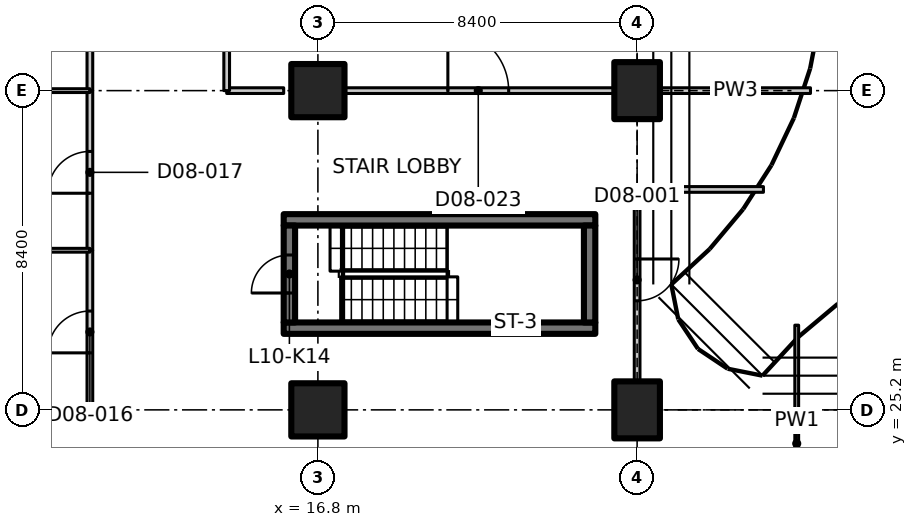
"""IFC4 building model, lengths in metres.
Left out: names, types, materials, properties, quantities, classifications, styles, units other than length and angle.
Written with IfcOpenShell. Run it as: python <this file> out.ifc"""

import sys

from ifc_helpers import new_model, si_unit, direction, frame, frame_2d, origin, origin_2d, place, context, subcontext, project, spatial, polyline, rectangle, outline, extrude, element, fill, save


model = new_model("IFC4")
c1 = context("Model", 3, precision=1e-05, world=origin(), true_north=direction((0.0, 1.0)))
c2 = subcontext(c1, "Body", "Model", "MODEL_VIEW")
j1 = project(units=[si_unit("LENGTHUNIT", "METRE"), si_unit("PLANEANGLEUNIT", "RADIAN")], contexts=[c1])
p1 = place(None, origin())
s1 = spatial("IfcSite", under=j1, at=p1, CompositionType="ELEMENT")
p2 = place(p1, origin())
s2 = spatial("IfcBuilding", under=s1, at=p2, CompositionType="ELEMENT")
p3 = place(p2, frame((0.0, 0.0, 50.9)))
s3 = spatial("IfcBuildingStorey", under=s2, at=p3, CompositionType="ELEMENT", Elevation=50.9)
for number, where, z_axis, x_axis in (
    (1, (16.8, 25.2, 0.0), (0.0, 0.0, 1.0), (1.0, 0.0, 0.0)),
    (2, (16.8, 33.6, 0.0), (0.0, 0.0, 1.0), (1.0, 0.0, 0.0)),
):
    element("IfcColumn", number, at=place(p3, frame(where, z_axis=z_axis, x_axis=x_axis)), inside=s3, PredefinedType="COLUMN", context=c2, shape_type="SweptSolid", body=[
        extrude(rectangle(XDim=1.4, YDim=1.4, at=origin_2d()), origin(), (0.0, 0.0, 1.0), 3.35),
    ])
for number, where, z_axis, x_axis in (
    (3, (25.2, 25.2, 0.0), (0.0, 0.0, 1.0), (1.0, 0.0, 0.0)),
    (4, (25.2, 33.6, 0.0), (0.0, 0.0, 1.0), (1.0, 0.0, 0.0)),
):
    element("IfcColumn", number, at=place(p3, frame(where, z_axis=z_axis, x_axis=x_axis)), inside=s3, PredefinedType="COLUMN", context=c2, shape_type="SweptSolid", body=[
        extrude(rectangle(XDim=1.2, YDim=1.5, at=origin_2d()), origin(), (0.0, 0.0, 1.0), 3.35),
    ])
for number, where, z_axis, x_axis in (
    (5, (15.9, 27.35, 0.0), (0.0, 0.0, 1.0), (1.0, 0.0, 0.0)),
    (6, (15.9, 30.2, 0.0), (0.0, 0.0, 1.0), (1.0, 0.0, 0.0)),
):
    element("IfcWall", number, at=place(p3, frame(where, z_axis=z_axis, x_axis=x_axis)), inside=s3, PredefinedType="SHEAR", context=c2, shape_type="SweptSolid", body=[
        extrude(rectangle(XDim=8.2, YDim=0.3, at=frame_2d((4.1, 0.0))), origin(), (0.0, 0.0, 1.0), 3.35),
    ])
p4 = place(p3, frame((16.05, 27.5, 0.0), z_axis=(0.0, 0.0, 1.0), x_axis=(0.0, 1.0, 0.0)))
e7 = element("IfcWall", 7, at=p4, inside=s3, PredefinedType="SHEAR", context=c2, shape_type="SweptSolid", body=[
    extrude(rectangle(XDim=2.55, YDim=0.3, at=frame_2d((1.275, 0.0))), origin(), (0.0, 0.0, 1.0), 3.35),
])
p5 = place(p4, frame((0.775, 0.0, 0.0)))
e8 = element("IfcOpeningElement", 8, at=p5, cuts=e7, PredefinedType="OPENING", context=c2, shape_type="SweptSolid", body=[
    extrude(rectangle(XDim=1.0, YDim=2.1, at=frame_2d((0.5, 1.05))), frame((0.0, 0.16, 0.0), z_axis=(0.0, -1.0, 0.0), x_axis=(1.0, 0.0, 0.0)), (0.0, 0.0, 1.0), 0.32),
])
p6 = place(p3, frame((23.95, 27.5, 0.0), z_axis=(0.0, 0.0, 1.0), x_axis=(0.0, 1.0, 0.0)))
e9 = element("IfcWall", 9, at=p6, inside=s3, PredefinedType="SHEAR", context=c2, shape_type="SweptSolid", body=[
    extrude(rectangle(XDim=2.55, YDim=0.3, at=frame_2d((1.275, 0.0))), origin(), (0.0, 0.0, 1.0), 3.35),
])
p7 = place(p3, frame((29.4, 27.429, 0.0), z_axis=(0.0, 0.0, 1.0), x_axis=(0.0, -1.0, 0.0)))
e10 = element("IfcWall", 10, at=p7, inside=s3, PredefinedType="PARTITIONING", context=c2, shape_type="SweptSolid", body=[
    extrude(outline(polyline([(0.0, 0.0), (6.229, 0.0), (6.229, 3.33), (2.679, 3.33), (2.677, 2.98), (1.781, 2.98), (1.779, 3.33), (0.154, 3.33), (0.0, 3.33), (0.0, 0.0)])), frame((0.0, 0.05, 0.0), z_axis=(0.0, -1.0, 0.0), x_axis=(1.0, 0.0, 0.0)), (0.0, 0.0, 1.0), 0.1),
])
p8 = place(p3, frame((25.2, 31.0, 0.0), z_axis=(0.0, 0.0, 1.0), x_axis=(0.0, -1.0, 0.0)))
e11 = element("IfcWall", 11, at=p8, inside=s3, PredefinedType="PARTITIONING", context=c2, shape_type="SweptSolid", body=[
    extrude(outline(polyline([(0.0, 0.0), (5.03, 0.0), (5.03, 2.98), (0.0, 2.98), (0.0, 0.0)])), frame((0.0, 0.075, 0.0), z_axis=(0.0, -1.0, 0.0), x_axis=(1.0, 0.0, 0.0)), (0.0, 0.0, 1.0), 0.15),
])
p9 = place(p8, frame((1.83, 0.0, 0.0)))
e12 = element("IfcOpeningElement", 12, at=p9, cuts=e11, PredefinedType="OPENING", context=c2, shape_type="SweptSolid", body=[
    extrude(rectangle(XDim=1.1, YDim=2.1, at=frame_2d((0.55, 1.05))), frame((0.0, 0.085, 0.0), z_axis=(0.0, -1.0, 0.0), x_axis=(1.0, 0.0, 0.0)), (0.0, 0.0, 1.0), 0.17),
])
p10 = place(p3, frame((25.2, 31.0, 0.0), z_axis=(0.0, 0.0, 1.0), x_axis=(1.0, 0.0, 0.0)))
e13 = element("IfcWall", 13, at=p10, inside=s3, PredefinedType="PARTITIONING", context=c2, shape_type="SweptSolid", body=[
    extrude(rectangle(XDim=3.324, YDim=0.15, at=frame_2d((1.662, 0.0))), origin(), (0.0, 0.0, 1.0), 2.98),
])
p11 = place(p3, frame((10.8, 25.2, 0.0), z_axis=(0.0, 0.0, 1.0), x_axis=(0.0, 1.0, 0.0)))
e14 = element("IfcWall", 14, at=p11, inside=s3, PredefinedType="PARTITIONING", context=c2, shape_type="SweptSolid", body=[
    extrude(rectangle(XDim=4.2, YDim=0.15, at=frame_2d((2.1, 0.0))), origin(), (0.0, 0.0, 1.0), 3.33),
])
p12 = place(p11, frame((1.5, 0.0, 0.0)))
e15 = element("IfcOpeningElement", 15, at=p12, cuts=e14, PredefinedType="OPENING", context=c2, shape_type="SweptSolid", body=[
    extrude(rectangle(XDim=1.1, YDim=2.1, at=frame_2d((0.55, 1.05))), frame((0.0, 0.085, 0.0), z_axis=(0.0, -1.0, 0.0), x_axis=(1.0, 0.0, 0.0)), (0.0, 0.0, 1.0), 0.17),
])
p13 = place(p3, frame((10.8, 29.4, 0.0), z_axis=(0.0, 0.0, 1.0), x_axis=(0.0, 1.0, 0.0)))
e16 = element("IfcWall", 16, at=p13, inside=s3, PredefinedType="PARTITIONING", context=c2, shape_type="SweptSolid", body=[
    extrude(rectangle(XDim=4.2, YDim=0.15, at=frame_2d((2.1, 0.0))), origin(), (0.0, 0.0, 1.0), 3.33),
])
p14 = place(p13, frame((1.5, 0.0, 0.0)))
e17 = element("IfcOpeningElement", 17, at=p14, cuts=e16, PredefinedType="OPENING", context=c2, shape_type="SweptSolid", body=[
    extrude(rectangle(XDim=1.1, YDim=2.1, at=frame_2d((0.55, 1.05))), frame((0.0, 0.085, 0.0), z_axis=(0.0, -1.0, 0.0), x_axis=(1.0, 0.0, 0.0)), (0.0, 0.0, 1.0), 0.17),
])
p15 = place(p3, frame((14.4, 33.6, 0.0), z_axis=(0.0, 0.0, 1.0), x_axis=(1.0, 0.0, 0.0)))
e18 = element("IfcWall", 18, at=p15, inside=s3, PredefinedType="PARTITIONING", context=c2, shape_type="SweptSolid", body=[
    extrude(rectangle(XDim=1.5, YDim=0.15, at=frame_2d((0.75, 0.0))), origin(), (0.0, 0.0, 1.0), 3.33),
])
p16 = place(p3, frame((17.52, 33.6, 0.0), z_axis=(0.0, 0.0, 1.0), x_axis=(1.0, 0.0, 0.0)))
e19 = element("IfcWall", 19, at=p16, inside=s3, PredefinedType="PARTITIONING", context=c2, shape_type="SweptSolid", body=[
    extrude(rectangle(XDim=7.06, YDim=0.15, at=frame_2d((3.53, 0.0))), origin(), (0.0, 0.0, 1.0), 3.33),
])
p17 = place(p16, frame((2.7, 0.0, 0.0)))
e20 = element("IfcOpeningElement", 20, at=p17, cuts=e19, PredefinedType="OPENING", context=c2, shape_type="SweptSolid", body=[
    extrude(rectangle(XDim=1.6, YDim=2.1, at=frame_2d((0.8, 1.05))), frame((0.0, 0.085, 0.0), z_axis=(0.0, -1.0, 0.0), x_axis=(1.0, 0.0, 0.0)), (0.0, 0.0, 1.0), 0.17),
])
p18 = place(p3, frame((25.82, 33.6, 0.0), z_axis=(0.0, 0.0, 1.0), x_axis=(1.0, 0.0, 0.0)))
e21 = element("IfcWall", 21, at=p18, inside=s3, PredefinedType="PARTITIONING", context=c2, shape_type="SweptSolid", body=[
    extrude(rectangle(XDim=3.942, YDim=0.15, at=frame_2d((1.971, 0.0))), origin(), (0.0, 0.0, 1.0), 2.98),
])
p19 = place(p3, frame((10.8, 33.6, 0.0), z_axis=(0.0, 0.0, 1.0), x_axis=(0.0, 1.0, 0.0)))
e22 = element("IfcWall", 22, at=p19, inside=s3, PredefinedType="PARTITIONING", context=c2, shape_type="SweptSolid", body=[
    extrude(rectangle(XDim=4.2, YDim=0.15, at=frame_2d((2.1, 0.0))), origin(), (0.0, 0.0, 1.0), 3.33),
])
p20 = place(p19, frame((1.5, 0.0, 0.0)))
e23 = element("IfcOpeningElement", 23, at=p20, cuts=e22, PredefinedType="OPENING", context=c2, shape_type="SweptSolid", body=[
    extrude(rectangle(XDim=1.1, YDim=2.1, at=frame_2d((0.55, 1.05))), frame((0.0, 0.085, 0.0), z_axis=(0.0, -1.0, 0.0), x_axis=(1.0, 0.0, 0.0)), (0.0, 0.0, 1.0), 0.17),
])
p21 = place(p3, frame((14.4, 37.8, 0.0), z_axis=(0.0, 0.0, 1.0), x_axis=(0.0, -1.0, 0.0)))
e24 = element("IfcWall", 24, at=p21, inside=s3, PredefinedType="PARTITIONING", context=c2, shape_type="SweptSolid", body=[
    extrude(rectangle(XDim=4.2, YDim=0.15, at=frame_2d((2.1, 0.0))), origin(), (0.0, 0.0, 1.0), 3.33),
])
p22 = place(p3, frame((-1.174, 29.4, 0.0), z_axis=(0.0, 0.0, 1.0), x_axis=(1.0, 0.0, 0.0)))
e25 = element("IfcWall", 25, at=p22, inside=s3, PredefinedType="PARTITIONING", context=c2, shape_type="SweptSolid", body=[
    extrude(outline(polyline([(0.0, 0.0), (11.974, 0.0), (11.974, 3.33), (1.624, 3.33), (1.622, 2.98), (0.726, 2.98), (0.724, 3.33), (0.074, 3.33), (0.0, 3.33), (0.0, 0.0)])), frame((0.0, 0.05, 0.0), z_axis=(0.0, -1.0, 0.0), x_axis=(1.0, 0.0, 0.0)), (0.0, 0.0, 1.0), 0.1),
])
p23 = place(p3, frame((9.12, 33.6, 0.0), z_axis=(0.0, 0.0, 1.0), x_axis=(1.0, 0.0, 0.0)))
e26 = element("IfcWall", 26, at=p23, inside=s3, PredefinedType="PARTITIONING", context=c2, shape_type="SweptSolid", body=[
    extrude(rectangle(XDim=1.68, YDim=0.1, at=frame_2d((0.84, 0.0))), origin(), (0.0, 0.0, 1.0), 3.33),
])
p24 = place(p5, origin())
e27 = element("IfcDoor", 27, at=p24, inside=s3, OperationType="SINGLE_SWING_RIGHT", PredefinedType="DOOR", context=c2, shape_type="SweptSolid", body=[
    extrude(rectangle(XDim=1.0, YDim=2.1, at=frame_2d((0.5, 1.05))), frame((0.0, 0.025, 0.0), z_axis=(0.0, -1.0, 0.0), x_axis=(1.0, 0.0, 0.0)), (0.0, 0.0, 1.0), 0.05),
])
fill(e8, e27)
p25 = place(p9, origin())
e28 = element("IfcDoor", 28, at=p25, inside=s3, OperationType="SINGLE_SWING_RIGHT", PredefinedType="DOOR", context=c2, shape_type="SweptSolid", body=[
    extrude(rectangle(XDim=1.1, YDim=2.1, at=frame_2d((0.55, 1.05))), frame((0.0, 0.025, 0.0), z_axis=(0.0, -1.0, 0.0), x_axis=(1.0, 0.0, 0.0)), (0.0, 0.0, 1.0), 0.05),
])
fill(e12, e28)
p26 = place(p12, origin())
e29 = element("IfcDoor", 29, at=p26, inside=s3, OperationType="SINGLE_SWING_LEFT", PredefinedType="DOOR", context=c2, shape_type="SweptSolid", body=[
    extrude(rectangle(XDim=1.1, YDim=2.1, at=frame_2d((0.55, 1.05))), frame((0.0, 0.025, 0.0), z_axis=(0.0, -1.0, 0.0), x_axis=(1.0, 0.0, 0.0)), (0.0, 0.0, 1.0), 0.05),
])
fill(e15, e29)
p27 = place(p14, origin())
e30 = element("IfcDoor", 30, at=p27, inside=s3, OperationType="SINGLE_SWING_LEFT", PredefinedType="DOOR", context=c2, shape_type="SweptSolid", body=[
    extrude(rectangle(XDim=1.1, YDim=2.1, at=frame_2d((0.55, 1.05))), frame((0.0, 0.025, 0.0), z_axis=(0.0, -1.0, 0.0), x_axis=(1.0, 0.0, 0.0)), (0.0, 0.0, 1.0), 0.05),
])
fill(e17, e30)
p28 = place(p17, origin())
e31 = element("IfcDoor", 31, at=p28, inside=s3, OperationType="DOUBLE_DOOR_SINGLE_SWING", PredefinedType="DOOR", context=c2, shape_type="SweptSolid", body=[
    extrude(rectangle(XDim=1.6, YDim=2.1, at=frame_2d((0.8, 1.05))), frame((0.0, 0.025, 0.0), z_axis=(0.0, -1.0, 0.0), x_axis=(1.0, 0.0, 0.0)), (0.0, 0.0, 1.0), 0.05),
])
fill(e20, e31)
save(model, sys.argv[1])
